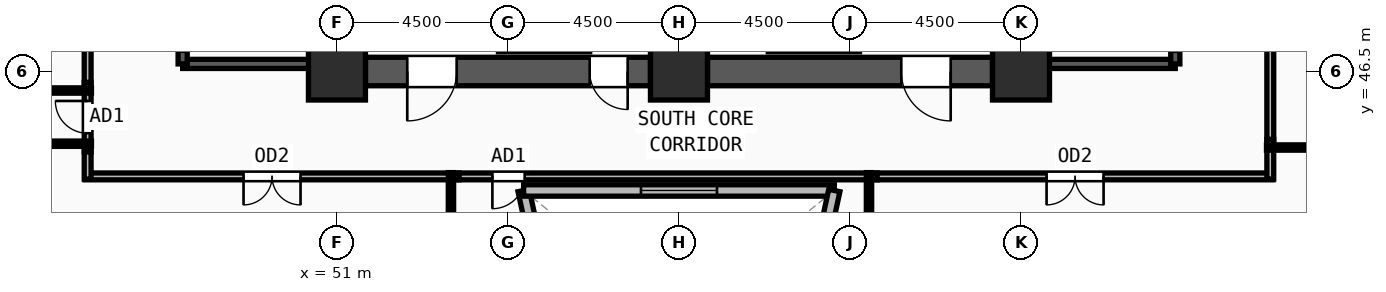
"""IFC4 building model, lengths in metres.
Left out: names, types, materials, properties, quantities, classifications, styles, units other than length and angle.
Written with IfcOpenShell. Run it as: python <this file> out.ifc"""

import sys

from ifc_helpers import new_model, si_unit, direction, frame, frame_2d, origin, origin_2d, place, context, subcontext, project, spatial, rectangle, extrude, source, transform, mapped, element, fill, save


model = new_model("IFC4")
c1 = context("Model", 3, precision=1e-05, world=origin(), true_north=direction((0.0, 1.0)))
c2 = subcontext(c1, "Body", "Model", "MODEL_VIEW")
j1 = project(units=[si_unit("LENGTHUNIT", "METRE"), si_unit("PLANEANGLEUNIT", "RADIAN")], contexts=[c1])
p1 = place(None, origin())
s1 = spatial("IfcSite", under=j1, at=p1, CompositionType="ELEMENT")
p2 = place(p1, origin())
s2 = spatial("IfcBuilding", under=s1, at=p2, CompositionType="ELEMENT")
p3 = place(p2, frame((0.0, 0.0, 124.5)))
s3 = spatial("IfcBuildingStorey", under=s2, at=p3, CompositionType="ELEMENT", Elevation=124.5)
m1 = source(origin(), c2, "Body", "SweptSolid", [
    extrude(rectangle(XDim=1.5, YDim=1.5, at=origin_2d()), origin(), (0.0, 0.0, 1.0), 3.75),
])
for number, where, z_axis, x_axis in (
    (1, (51.0, 46.5, 0.0), (0.0, 0.0, 1.0), (1.0, 0.0, 0.0)),
    (2, (60.0, 46.5, 0.0), (0.0, 0.0, 1.0), (1.0, 0.0, 0.0)),
    (3, (69.0, 46.5, 0.0), (0.0, 0.0, 1.0), (1.0, 0.0, 0.0)),
):
    element("IfcColumn", number, at=place(p3, frame(where, z_axis=z_axis, x_axis=x_axis)), inside=s3, PredefinedType="COLUMN", context=c2, shape_type="MappedRepresentation", body=[
        mapped(m1, transform((0.0, 0.0, 0.0), x_axis=(1.0, 0.0, 0.0), y_axis=(0.0, 1.0, 0.0), z_axis=(0.0, 0.0, 1.0), scale=1.0)),
    ])
p4 = place(p3, frame((66.303, 16.253, 0.0), z_axis=(0.0, 0.0, 1.0), x_axis=(0.549799789037, 0.835296469509, 0.0)))
e4 = element("IfcWall", 4, at=p4, inside=s3, PredefinedType="SOLIDWALL", context=c2, shape_type="SweptSolid", body=[
    extrude(rectangle(XDim=31.679, YDim=0.42, at=frame_2d((15.839, 0.0))), origin(), (0.0, 0.0, 1.0), 3.57),
])
m2 = source(origin(), c2, "Body", "SweptSolid", [
    extrude(rectangle(XDim=1.65, YDim=1.95, at=frame_2d((0.825, 0.975))), frame((0.0, 0.22, 0.0), z_axis=(0.0, -1.0, 0.0), x_axis=(1.0, 0.0, 0.0)), (0.0, 0.0, 1.0), 0.44),
])
p5 = place(p4, frame((7.095, 0.0, 0.55)))
e5 = element("IfcOpeningElement", 5, at=p5, cuts=e4, PredefinedType="OPENING", context=c2, shape_type="MappedRepresentation", body=[
    mapped(m2, transform((0.0, 0.0, 0.0), x_axis=(1.0, 0.0, 0.0), y_axis=(0.0, 1.0, 0.0), z_axis=(0.0, 0.0, 1.0), scale=1.0)),
])
p6 = place(p4, frame((15.014, 0.0, 0.55)))
e6 = element("IfcOpeningElement", 6, at=p6, cuts=e4, PredefinedType="OPENING", context=c2, shape_type="MappedRepresentation", body=[
    mapped(m2, transform((0.0, 0.0, 0.0), x_axis=(1.0, 0.0, 0.0), y_axis=(0.0, 1.0, 0.0), z_axis=(0.0, 0.0, 1.0), scale=1.0)),
])
p7 = place(p4, frame((22.934, 0.0, 0.55)))
e7 = element("IfcOpeningElement", 7, at=p7, cuts=e4, PredefinedType="OPENING", context=c2, shape_type="MappedRepresentation", body=[
    mapped(m2, transform((0.0, 0.0, 0.0), x_axis=(1.0, 0.0, 0.0), y_axis=(0.0, 1.0, 0.0), z_axis=(0.0, 0.0, 1.0), scale=1.0)),
])
p8 = place(p3, frame((68.25, 46.5, 0.0), z_axis=(0.0, 0.0, 1.0), x_axis=(-1.0, 0.0, 0.0)))
e8 = element("IfcWall", 8, at=p8, inside=s3, PredefinedType="SHEAR", context=c2, shape_type="SweptSolid", body=[
    extrude(rectangle(XDim=7.5, YDim=0.75, at=frame_2d((3.75, 0.0))), origin(), (0.0, 0.0, 1.0), 3.57),
])
m3 = source(origin(), c2, "Body", "SweptSolid", [
    extrude(rectangle(XDim=1.3, YDim=2.2, at=frame_2d((0.65, 1.1))), frame((0.0, 0.385, 0.0), z_axis=(0.0, -1.0, 0.0), x_axis=(1.0, 0.0, 0.0)), (0.0, 0.0, 1.0), 0.77),
])
p9 = place(p8, frame((1.1, 0.0, 0.0)))
e9 = element("IfcOpeningElement", 9, at=p9, cuts=e8, PredefinedType="OPENING", context=c2, shape_type="MappedRepresentation", body=[
    mapped(m3, transform((0.0, 0.0, 0.0), x_axis=(1.0, 0.0, 0.0), y_axis=(0.0, 1.0, 0.0), z_axis=(0.0, 0.0, 1.0), scale=1.0)),
])
p10 = place(p3, frame((59.25, 46.5, 0.0), z_axis=(0.0, 0.0, 1.0), x_axis=(-1.0, 0.0, 0.0)))
e10 = element("IfcWall", 10, at=p10, inside=s3, PredefinedType="SHEAR", context=c2, shape_type="SweptSolid", body=[
    extrude(rectangle(XDim=7.5, YDim=0.75, at=frame_2d((3.75, 0.0))), origin(), (0.0, 0.0, 1.0), 3.57),
])
p11 = place(p10, frame((5.1, 0.0, 0.0)))
e11 = element("IfcOpeningElement", 11, at=p11, cuts=e10, PredefinedType="OPENING", context=c2, shape_type="MappedRepresentation", body=[
    mapped(m3, transform((0.0, 0.0, 0.0), x_axis=(1.0, 0.0, 0.0), y_axis=(0.0, 1.0, 0.0), z_axis=(0.0, 0.0, 1.0), scale=1.0)),
])
m4 = source(origin(), c2, "Body", "SweptSolid", [
    extrude(rectangle(XDim=1.0, YDim=2.2, at=frame_2d((0.5, 1.1))), frame((0.0, 0.385, 0.0), z_axis=(0.0, -1.0, 0.0), x_axis=(1.0, 0.0, 0.0)), (0.0, 0.0, 1.0), 0.77),
])
p12 = place(p10, frame((0.6, 0.0, 0.0)))
e12 = element("IfcOpeningElement", 12, at=p12, cuts=e10, PredefinedType="OPENING", context=c2, shape_type="MappedRepresentation", body=[
    mapped(m4, transform((0.0, 0.0, 0.0), x_axis=(1.0, 0.0, 0.0), y_axis=(0.0, 1.0, 0.0), z_axis=(0.0, 0.0, 1.0), scale=1.0)),
])
p13 = place(p3, frame((46.94, 46.7, 0.0), z_axis=(0.0, 0.0, 1.0), x_axis=(1.0, 0.0, 0.0)))
e13 = element("IfcWall", 13, at=p13, inside=s3, PredefinedType="SOLIDWALL", context=c2, shape_type="SweptSolid", body=[
    extrude(rectangle(XDim=3.44, YDim=0.24, at=frame_2d((1.72, 0.0))), origin(), (0.0, 0.0, 1.0), 3.57),
])
p14 = place(p3, frame((50.38, 46.7, 0.0), z_axis=(0.0, 0.0, 1.0), x_axis=(0.0, 1.0, 0.0)))
e14 = element("IfcWall", 14, at=p14, inside=s3, PredefinedType="SOLIDWALL", context=c2, shape_type="SweptSolid", body=[
    extrude(rectangle(XDim=7.82, YDim=0.24, at=frame_2d((3.91, 0.0))), origin(), (0.0, 0.0, 1.0), 3.57),
])
p15 = place(p3, frame((46.94, 54.52, 0.0), z_axis=(0.0, 0.0, 1.0), x_axis=(0.0, -1.0, 0.0)))
e15 = element("IfcWall", 15, at=p15, inside=s3, PredefinedType="SOLIDWALL", context=c2, shape_type="SweptSolid", body=[
    extrude(rectangle(XDim=7.82, YDim=0.24, at=frame_2d((3.91, 0.0))), origin(), (0.0, 0.0, 1.0), 3.57),
])
m5 = source(origin(), c2, "Body", "SweptSolid", [
    extrude(rectangle(XDim=1.2, YDim=2.2, at=frame_2d((0.6, 1.1))), frame((0.0, 0.13, 0.0), z_axis=(0.0, -1.0, 0.0), x_axis=(1.0, 0.0, 0.0)), (0.0, 0.0, 1.0), 0.26),
])
p16 = place(p15, frame((6.3, 0.0, 0.0)))
e16 = element("IfcOpeningElement", 16, at=p16, cuts=e15, PredefinedType="OPENING", context=c2, shape_type="MappedRepresentation", body=[
    mapped(m5, transform((0.0, 0.0, 0.0), x_axis=(1.0, 0.0, 0.0), y_axis=(0.0, 1.0, 0.0), z_axis=(0.0, 0.0, 1.0), scale=1.0)),
])
p17 = place(p3, frame((69.62, 46.7, 0.0), z_axis=(0.0, 0.0, 1.0), x_axis=(1.0, 0.0, 0.0)))
e17 = element("IfcWall", 17, at=p17, inside=s3, PredefinedType="SOLIDWALL", context=c2, shape_type="SweptSolid", body=[
    extrude(rectangle(XDim=3.44, YDim=0.24, at=frame_2d((1.72, 0.0))), origin(), (0.0, 0.0, 1.0), 3.57),
])
p18 = place(p3, frame((73.06, 46.7, 0.0), z_axis=(0.0, 0.0, 1.0), x_axis=(0.0, 1.0, 0.0)))
e18 = element("IfcWall", 18, at=p18, inside=s3, PredefinedType="SOLIDWALL", context=c2, shape_type="SweptSolid", body=[
    extrude(rectangle(XDim=7.82, YDim=0.24, at=frame_2d((3.91, 0.0))), origin(), (0.0, 0.0, 1.0), 3.57),
])
p19 = place(p18, frame((0.32, 0.0, 0.0)))
e19 = element("IfcOpeningElement", 19, at=p19, cuts=e18, PredefinedType="OPENING", context=c2, shape_type="MappedRepresentation", body=[
    mapped(m5, transform((0.0, 0.0, 0.0), x_axis=(1.0, 0.0, 0.0), y_axis=(0.0, 1.0, 0.0), z_axis=(0.0, 0.0, 1.0), scale=1.0)),
])
p20 = place(p3, frame((69.62, 54.52, 0.0), z_axis=(0.0, 0.0, 1.0), x_axis=(0.0, -1.0, 0.0)))
e20 = element("IfcWall", 20, at=p20, inside=s3, PredefinedType="SOLIDWALL", context=c2, shape_type="SweptSolid", body=[
    extrude(rectangle(XDim=7.82, YDim=0.24, at=frame_2d((3.91, 0.0))), origin(), (0.0, 0.0, 1.0), 3.57),
])
p21 = place(p3, frame((57.343, 36.754, 0.0), z_axis=(0.0, 0.0, 1.0), x_axis=(-0.21138587267, 0.977402687144, 0.0)))
e21 = element("IfcWall", 21, at=p21, inside=s3, PredefinedType="SOLIDWALL", context=c2, shape_type="SweptSolid", body=[
    extrude(rectangle(XDim=6.769, YDim=0.3, at=frame_2d((3.385, 0.0))), origin(), (0.0, 0.0, 1.0), 3.57),
])
m6 = source(origin(), c2, "Body", "SweptSolid", [
    extrude(rectangle(XDim=2.0, YDim=1.9, at=frame_2d((1.0, 0.95))), frame((0.0, 0.16, 0.0), z_axis=(0.0, -1.0, 0.0), x_axis=(1.0, 0.0, 0.0)), (0.0, 0.0, 1.0), 0.32),
])
p22 = place(p21, frame((2.384, 0.0, 0.55)))
e22 = element("IfcOpeningElement", 22, at=p22, cuts=e21, PredefinedType="OPENING", context=c2, shape_type="MappedRepresentation", body=[
    mapped(m6, transform((0.0, 0.0, 0.0), x_axis=(1.0, 0.0, 0.0), y_axis=(0.0, 1.0, 0.0), z_axis=(0.0, 0.0, 1.0), scale=1.0)),
])
p23 = place(p3, frame((55.912, 43.37, 0.0), z_axis=(0.0, 0.0, 1.0), x_axis=(1.0, 0.0, 0.0)))
e23 = element("IfcWall", 23, at=p23, inside=s3, PredefinedType="SOLIDWALL", context=c2, shape_type="SweptSolid", body=[
    extrude(rectangle(XDim=8.176, YDim=0.3, at=frame_2d((4.088, 0.0))), origin(), (0.0, 0.0, 1.0), 3.57),
])
p24 = place(p23, frame((3.088, 0.0, 0.55)))
e24 = element("IfcOpeningElement", 24, at=p24, cuts=e23, PredefinedType="OPENING", context=c2, shape_type="MappedRepresentation", body=[
    mapped(m6, transform((0.0, 0.0, 0.0), x_axis=(1.0, 0.0, 0.0), y_axis=(0.0, 1.0, 0.0), z_axis=(0.0, 0.0, 1.0), scale=1.0)),
])
p25 = place(p3, frame((64.088, 43.37, 0.0), z_axis=(0.0, 0.0, 1.0), x_axis=(-0.21138587267, -0.977402687144, 0.0)))
e25 = element("IfcWall", 25, at=p25, inside=s3, PredefinedType="SOLIDWALL", context=c2, shape_type="SweptSolid", body=[
    extrude(rectangle(XDim=6.769, YDim=0.3, at=frame_2d((3.385, 0.0))), origin(), (0.0, 0.0, 1.0), 3.57),
])
p26 = place(p25, frame((2.384, 0.0, 0.55)))
e26 = element("IfcOpeningElement", 26, at=p26, cuts=e25, PredefinedType="OPENING", context=c2, shape_type="MappedRepresentation", body=[
    mapped(m6, transform((0.0, 0.0, 0.0), x_axis=(1.0, 0.0, 0.0), y_axis=(0.0, 1.0, 0.0), z_axis=(0.0, 0.0, 1.0), scale=1.0)),
])
p27 = place(p3, frame((44.44, 44.385, 0.0), z_axis=(0.0, 0.0, 1.0), x_axis=(0.0, 1.0, 0.0)))
e27 = element("IfcWall", 27, at=p27, inside=s3, PredefinedType="PARTITIONING", context=c2, shape_type="SweptSolid", body=[
    extrude(rectangle(XDim=1.83, YDim=0.18, at=frame_2d((0.915, 0.0))), origin(), (0.0, 0.0, 1.0), 3.57),
])
m7 = source(origin(), c2, "Body", "SweptSolid", [
    extrude(rectangle(XDim=0.85, YDim=2.1, at=frame_2d((0.425, 1.05))), frame((0.0, 0.1, 0.0), z_axis=(0.0, -1.0, 0.0), x_axis=(1.0, 0.0, 0.0)), (0.0, 0.0, 1.0), 0.2),
])
p28 = place(p27, frame((0.49, 0.0, 0.0)))
e28 = element("IfcOpeningElement", 28, at=p28, cuts=e27, PredefinedType="OPENING", context=c2, shape_type="MappedRepresentation", body=[
    mapped(m7, transform((0.0, 0.0, 0.0), x_axis=(1.0, 0.0, 0.0), y_axis=(0.0, 1.0, 0.0), z_axis=(0.0, 0.0, 1.0), scale=1.0)),
])
p29 = place(p3, frame((54.215, 43.74, 0.0), z_axis=(0.0, 0.0, 1.0), x_axis=(-1.0, 0.0, 0.0)))
e29 = element("IfcWall", 29, at=p29, inside=s3, PredefinedType="PARTITIONING", context=c2, shape_type="SweptSolid", body=[
    extrude(rectangle(XDim=9.845, YDim=0.18, at=frame_2d((4.922, 0.0))), origin(), (0.0, 0.0, 1.0), 3.57),
])
m8 = source(origin(), c2, "Body", "SweptSolid", [
    extrude(rectangle(XDim=1.5, YDim=2.2, at=frame_2d((0.75, 1.1))), frame((0.0, 0.1, 0.0), z_axis=(0.0, -1.0, 0.0), x_axis=(1.0, 0.0, 0.0)), (0.0, 0.0, 1.0), 0.2),
])
p30 = place(p29, frame((4.173, 0.0, 0.0)))
e30 = element("IfcOpeningElement", 30, at=p30, cuts=e29, PredefinedType="OPENING", context=c2, shape_type="MappedRepresentation", body=[
    mapped(m8, transform((0.0, 0.0, 0.0), x_axis=(1.0, 0.0, 0.0), y_axis=(0.0, 1.0, 0.0), z_axis=(0.0, 0.0, 1.0), scale=1.0)),
])
p31 = place(p3, frame((65.215, 43.74, 0.0), z_axis=(0.0, 0.0, 1.0), x_axis=(-1.0, 0.0, 0.0)))
e31 = element("IfcWall", 31, at=p31, inside=s3, PredefinedType="PARTITIONING", context=c2, shape_type="SweptSolid", body=[
    extrude(rectangle(XDim=11.0, YDim=0.18, at=frame_2d((5.5, 0.0))), origin(), (0.0, 0.0, 1.0), 3.57),
])
p32 = place(p31, frame((9.275, 0.0, 0.0)))
e32 = element("IfcOpeningElement", 32, at=p32, cuts=e31, PredefinedType="OPENING", context=c2, shape_type="MappedRepresentation", body=[
    mapped(m7, transform((0.0, 0.0, 0.0), x_axis=(1.0, 0.0, 0.0), y_axis=(0.0, 1.0, 0.0), z_axis=(0.0, 0.0, 1.0), scale=1.0)),
])
p33 = place(p3, frame((75.63, 43.74, 0.0), z_axis=(0.0, 0.0, 1.0), x_axis=(-1.0, 0.0, 0.0)))
e33 = element("IfcWall", 33, at=p33, inside=s3, PredefinedType="PARTITIONING", context=c2, shape_type="SweptSolid", body=[
    extrude(rectangle(XDim=10.415, YDim=0.18, at=frame_2d((5.208, 0.0))), origin(), (0.0, 0.0, 1.0), 3.57),
])
p34 = place(p33, frame((4.457, 0.0, 0.0)))
e34 = element("IfcOpeningElement", 34, at=p34, cuts=e33, PredefinedType="OPENING", context=c2, shape_type="MappedRepresentation", body=[
    mapped(m8, transform((0.0, 0.0, 0.0), x_axis=(1.0, 0.0, 0.0), y_axis=(0.0, 1.0, 0.0), z_axis=(0.0, 0.0, 1.0), scale=1.0)),
])
p35 = place(p3, frame((44.44, 46.215, 0.0), z_axis=(0.0, 0.0, 1.0), x_axis=(0.0, 1.0, 0.0)))
e35 = element("IfcWall", 35, at=p35, inside=s3, PredefinedType="PARTITIONING", context=c2, shape_type="SweptSolid", body=[
    extrude(rectangle(XDim=7.795, YDim=0.18, at=frame_2d((3.897, 0.0))), origin(), (0.0, 0.0, 1.0), 3.57),
])
p36 = place(p3, frame((44.44, 43.67, 0.0), z_axis=(0.0, 0.0, 1.0), x_axis=(0.0, 1.0, 0.0)))
e36 = element("IfcWall", 36, at=p36, inside=s3, PredefinedType="PARTITIONING", context=c2, shape_type="SweptSolid", body=[
    extrude(rectangle(XDim=0.715, YDim=0.18, at=frame_2d((0.357, 0.0))), origin(), (0.0, 0.0, 1.0), 3.57),
])
p37 = place(p3, frame((75.56, 44.715, 0.0), z_axis=(0.0, 0.0, 1.0), x_axis=(0.0, -1.0, 0.0)))
e37 = element("IfcWall", 37, at=p37, inside=s3, PredefinedType="PARTITIONING", context=c2, shape_type="SweptSolid", body=[
    extrude(rectangle(XDim=1.045, YDim=0.18, at=frame_2d((0.522, 0.0))), origin(), (0.0, 0.0, 1.0), 3.57),
])
p38 = place(p3, frame((75.56, 54.01, 0.0), z_axis=(0.0, 0.0, 1.0), x_axis=(0.0, -1.0, 0.0)))
e38 = element("IfcWall", 38, at=p38, inside=s3, PredefinedType="PARTITIONING", context=c2, shape_type="SweptSolid", body=[
    extrude(rectangle(XDim=9.295, YDim=0.18, at=frame_2d((4.647, 0.0))), origin(), (0.0, 0.0, 1.0), 3.155),
])
p39 = place(p3, frame((44.54, 44.6, 0.0), z_axis=(0.0, 0.0, 1.0), x_axis=(-1.0, 0.0, 0.0)))
e39 = element("IfcWall", 39, at=p39, inside=s3, PredefinedType="PARTITIONING", context=c2, shape_type="SweptSolid", body=[
    extrude(rectangle(XDim=9.639, YDim=0.14, at=frame_2d((4.82, 0.0))), origin(), (0.0, 0.0, 1.0), 3.57),
])
p40 = place(p3, frame((44.54, 46.0, 0.0), z_axis=(0.0, 0.0, 1.0), x_axis=(-1.0, 0.0, 0.0)))
e40 = element("IfcWall", 40, at=p40, inside=s3, PredefinedType="PARTITIONING", context=c2, shape_type="SweptSolid", body=[
    extrude(rectangle(XDim=10.341, YDim=0.14, at=frame_2d((5.17, 0.0))), origin(), (0.0, 0.0, 1.0), 3.57),
])
p41 = place(p3, frame((75.46, 44.5, 0.0), z_axis=(0.0, 0.0, 1.0), x_axis=(1.0, 0.0, 0.0)))
e41 = element("IfcWall", 41, at=p41, inside=s3, PredefinedType="PARTITIONING", context=c2, shape_type="SweptSolid", body=[
    extrude(rectangle(XDim=9.93, YDim=0.14, at=frame_2d((4.965, 0.0))), origin(), (0.0, 0.0, 1.0), 3.57),
])
p42 = place(p3, frame((54.0, 43.84, 0.0), z_axis=(0.0, 0.0, 1.0), x_axis=(0.0, -1.0, 0.0)))
e42 = element("IfcWall", 42, at=p42, inside=s3, PredefinedType="PARTITIONING", context=c2, shape_type="SweptSolid", body=[
    extrude(rectangle(XDim=28.83, YDim=0.14, at=frame_2d((14.415, 0.0))), origin(), (0.0, 0.0, 1.0), 2.755),
])
p43 = place(p3, frame((65.0, 43.84, 0.0), z_axis=(0.0, 0.0, 1.0), x_axis=(0.0, -1.0, 0.0)))
e43 = element("IfcWall", 43, at=p43, inside=s3, PredefinedType="PARTITIONING", context=c2, shape_type="SweptSolid", body=[
    extrude(rectangle(XDim=28.588, YDim=0.14, at=frame_2d((14.294, 0.0))), origin(), (0.0, 0.0, 1.0), 3.57),
])
m9 = source(origin(), c2, "Body", "SweptSolid", [
    extrude(rectangle(XDim=1.3, YDim=2.2, at=frame_2d((0.65, 1.1))), frame((0.0, 0.025, 0.0), z_axis=(0.0, -1.0, 0.0), x_axis=(1.0, 0.0, 0.0)), (0.0, 0.0, 1.0), 0.05),
])
p44 = place(p11, origin())
e44 = element("IfcDoor", 44, at=p44, inside=s3, OperationType="SINGLE_SWING_RIGHT", PredefinedType="DOOR", context=c2, shape_type="MappedRepresentation", body=[
    mapped(m9, transform((0.0, 0.0, 0.0), x_axis=(1.0, 0.0, 0.0), y_axis=(0.0, 1.0, 0.0), z_axis=(0.0, 0.0, 1.0), scale=1.0)),
])
fill(e11, e44)
m10 = source(origin(), c2, "Body", "SweptSolid", [
    extrude(rectangle(XDim=1.0, YDim=2.2, at=frame_2d((0.5, 1.1))), frame((0.0, 0.025, 0.0), z_axis=(0.0, -1.0, 0.0), x_axis=(1.0, 0.0, 0.0)), (0.0, 0.0, 1.0), 0.05),
])
p45 = place(p12, origin())
e45 = element("IfcDoor", 45, at=p45, inside=s3, OperationType="SINGLE_SWING_LEFT", PredefinedType="DOOR", context=c2, shape_type="MappedRepresentation", body=[
    mapped(m10, transform((0.0, 0.0, 0.0), x_axis=(1.0, 0.0, 0.0), y_axis=(0.0, 1.0, 0.0), z_axis=(0.0, 0.0, 1.0), scale=1.0)),
])
fill(e12, e45)
p46 = place(p9, origin())
e46 = element("IfcDoor", 46, at=p46, inside=s3, OperationType="SINGLE_SWING_LEFT", PredefinedType="DOOR", context=c2, shape_type="MappedRepresentation", body=[
    mapped(m9, transform((0.0, 0.0, 0.0), x_axis=(1.0, 0.0, 0.0), y_axis=(0.0, 1.0, 0.0), z_axis=(0.0, 0.0, 1.0), scale=1.0)),
])
fill(e9, e46)
m11 = source(origin(), c2, "Body", "SweptSolid", [
    extrude(rectangle(XDim=2.0, YDim=1.9, at=frame_2d((1.0, 0.95))), frame((0.0, 0.03, 0.0), z_axis=(0.0, -1.0, 0.0), x_axis=(1.0, 0.0, 0.0)), (0.0, 0.0, 1.0), 0.06),
])
p47 = place(p24, origin())
e47 = element("IfcWindow", 47, at=p47, inside=s3, PartitioningType="DOUBLE_PANEL_VERTICAL", PredefinedType="WINDOW", context=c2, shape_type="MappedRepresentation", body=[
    mapped(m11, transform((0.0, 0.0, 0.0), x_axis=(1.0, 0.0, 0.0), y_axis=(0.0, 1.0, 0.0), z_axis=(0.0, 0.0, 1.0), scale=1.0)),
])
fill(e24, e47)
m12 = source(origin(), c2, "Body", "SweptSolid", [
    extrude(rectangle(XDim=0.85, YDim=2.1, at=frame_2d((0.425, 1.05))), frame((0.0, 0.025, 0.0), z_axis=(0.0, -1.0, 0.0), x_axis=(1.0, 0.0, 0.0)), (0.0, 0.0, 1.0), 0.05),
])
p48 = place(p28, origin())
e48 = element("IfcDoor", 48, at=p48, inside=s3, OperationType="SINGLE_SWING_RIGHT", PredefinedType="DOOR", context=c2, shape_type="MappedRepresentation", body=[
    mapped(m12, transform((0.0, 0.0, 0.0), x_axis=(1.0, 0.0, 0.0), y_axis=(0.0, 1.0, 0.0), z_axis=(0.0, 0.0, 1.0), scale=1.0)),
])
fill(e28, e48)
m13 = source(origin(), c2, "Body", "SweptSolid", [
    extrude(rectangle(XDim=1.5, YDim=2.2, at=frame_2d((0.75, 1.1))), frame((0.0, 0.025, 0.0), z_axis=(0.0, -1.0, 0.0), x_axis=(1.0, 0.0, 0.0)), (0.0, 0.0, 1.0), 0.05),
])
p49 = place(p30, origin())
e49 = element("IfcDoor", 49, at=p49, inside=s3, OperationType="DOUBLE_DOOR_SINGLE_SWING", PredefinedType="DOOR", context=c2, shape_type="MappedRepresentation", body=[
    mapped(m13, transform((0.0, 0.0, 0.0), x_axis=(1.0, 0.0, 0.0), y_axis=(0.0, 1.0, 0.0), z_axis=(0.0, 0.0, 1.0), scale=1.0)),
])
fill(e30, e49)
p50 = place(p32, origin())
e50 = element("IfcDoor", 50, at=p50, inside=s3, OperationType="SINGLE_SWING_RIGHT", PredefinedType="DOOR", context=c2, shape_type="MappedRepresentation", body=[
    mapped(m12, transform((0.0, 0.0, 0.0), x_axis=(1.0, 0.0, 0.0), y_axis=(0.0, 1.0, 0.0), z_axis=(0.0, 0.0, 1.0), scale=1.0)),
])
fill(e32, e50)
p51 = place(p34, origin())
e51 = element("IfcDoor", 51, at=p51, inside=s3, OperationType="DOUBLE_DOOR_SINGLE_SWING", PredefinedType="DOOR", context=c2, shape_type="MappedRepresentation", body=[
    mapped(m13, transform((0.0, 0.0, 0.0), x_axis=(1.0, 0.0, 0.0), y_axis=(0.0, 1.0, 0.0), z_axis=(0.0, 0.0, 1.0), scale=1.0)),
])
fill(e34, e51)
save(model, sys.argv[1])
